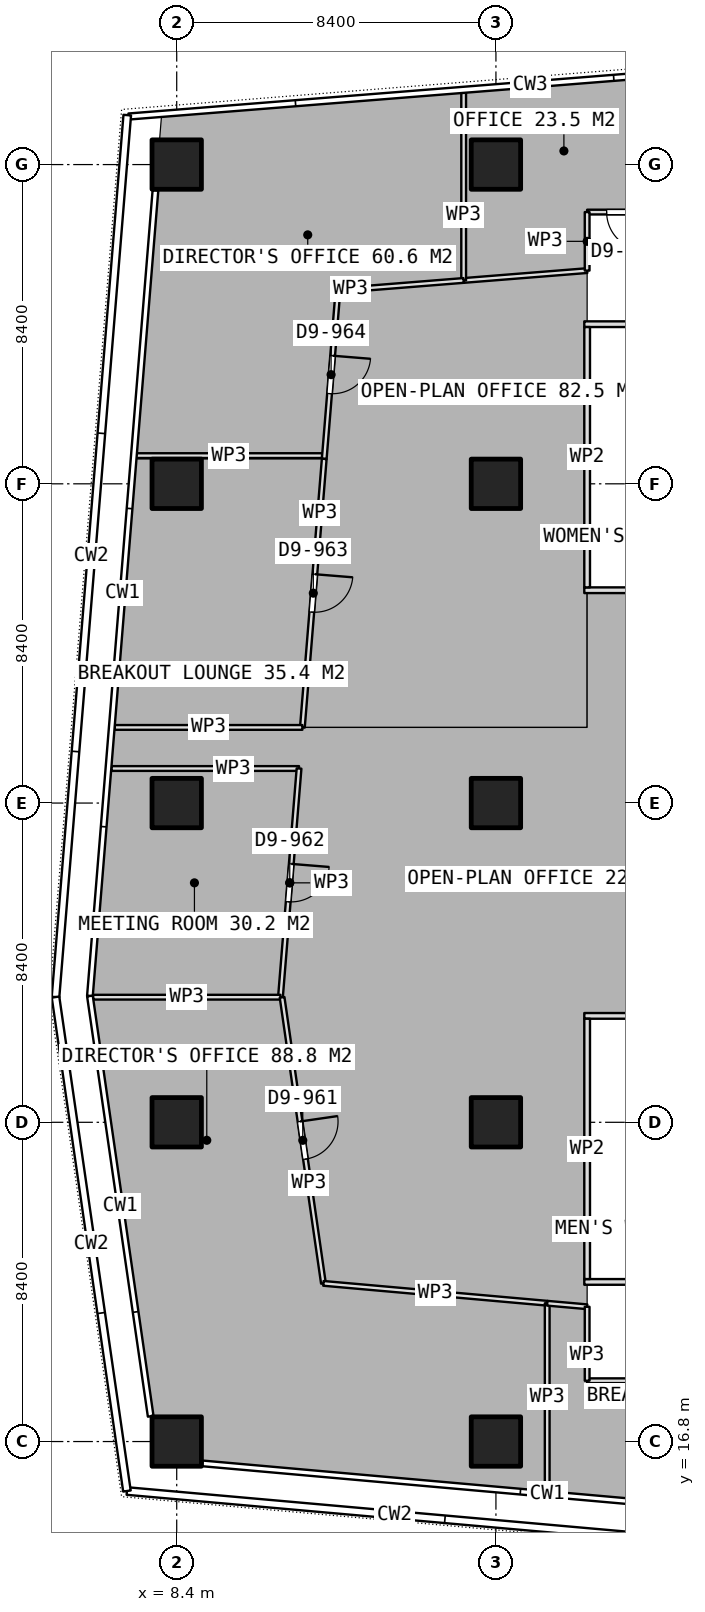
"""IFC4 building model, lengths in metres.
Left out: names, types, materials, properties, quantities, classifications, styles, units other than length and angle.
Written with IfcOpenShell. Run it as: python <this file> out.ifc"""

import sys

from ifc_helpers import new_model, si_unit, direction, frame, frame_2d, origin, origin_2d, place, context, subcontext, project, spatial, rectangle, extrude, element, fill, save


model = new_model("IFC4")
c1 = context("Model", 3, precision=1e-05, world=origin(), true_north=direction((0.0, 1.0)))
c2 = subcontext(c1, "Body", "Model", "MODEL_VIEW")
j1 = project(units=[si_unit("LENGTHUNIT", "METRE"), si_unit("PLANEANGLEUNIT", "RADIAN")], contexts=[c1])
p1 = place(None, origin())
s1 = spatial("IfcSite", under=j1, at=p1, CompositionType="ELEMENT")
p2 = place(p1, origin())
s2 = spatial("IfcBuilding", under=s1, at=p2, CompositionType="ELEMENT")
p3 = place(p2, frame((0.0, 0.0, 257.6)))
s3 = spatial("IfcBuildingStorey", under=s2, at=p3, CompositionType="ELEMENT", Elevation=257.6)
for number, where, z_axis, x_axis in (
    (1, (8.4, 16.8, 0.0), (0.0, 0.0, 1.0), (1.0, 0.0, 0.0)),
    (2, (8.4, 25.2, 0.0), (0.0, 0.0, 1.0), (1.0, 0.0, 0.0)),
    (3, (8.4, 33.6, 0.0), (0.0, 0.0, 1.0), (1.0, 0.0, 0.0)),
    (4, (8.4, 42.0, 0.0), (0.0, 0.0, 1.0), (1.0, 0.0, 0.0)),
    (5, (8.4, 50.4, 0.0), (0.0, 0.0, 1.0), (1.0, 0.0, 0.0)),
    (6, (16.8, 16.8, 0.0), (0.0, 0.0, 1.0), (1.0, 0.0, 0.0)),
    (7, (16.8, 25.2, 0.0), (0.0, 0.0, 1.0), (1.0, 0.0, 0.0)),
    (8, (16.8, 33.6, 0.0), (0.0, 0.0, 1.0), (1.0, 0.0, 0.0)),
    (9, (16.8, 42.0, 0.0), (0.0, 0.0, 1.0), (1.0, 0.0, 0.0)),
    (10, (16.8, 50.4, 0.0), (0.0, 0.0, 1.0), (1.0, 0.0, 0.0)),
):
    element("IfcColumn", number, at=place(p3, frame(where, z_axis=z_axis, x_axis=x_axis)), inside=s3, PredefinedType="COLUMN", context=c2, shape_type="SweptSolid", body=[
        extrude(rectangle(XDim=1.3, YDim=1.3, at=origin_2d()), origin(), (0.0, 0.0, 1.0), 3.75),
    ])
for number, where, z_axis, x_axis in (
    (11, (19.125, 39.2, 0.0), (0.0, 0.0, 1.0), (1.0, 0.0, 0.0)),
    (12, (19.125, 46.2, 0.0), (0.0, 0.0, 1.0), (1.0, 0.0, 0.0)),
):
    element("IfcWall", number, at=place(p3, frame(where, z_axis=z_axis, x_axis=x_axis)), inside=s3, PredefinedType="PARTITIONING", context=c2, shape_type="SweptSolid", body=[
        extrude(rectangle(XDim=3.35, YDim=0.15, at=frame_2d((1.675, 0.0))), origin(), (0.0, 0.0, 1.0), 3.5),
    ])
p4 = place(p3, frame((19.2, 39.275, 0.0), z_axis=(0.0, 0.0, 1.0), x_axis=(0.0, 1.0, 0.0)))
e13 = element("IfcWall", 13, at=p4, inside=s3, PredefinedType="PARTITIONING", context=c2, shape_type="SweptSolid", body=[
    extrude(rectangle(XDim=6.85, YDim=0.15, at=frame_2d((3.425, 0.0))), origin(), (0.0, 0.0, 1.0), 3.5),
])
for number, where, z_axis, x_axis in (
    (14, (19.125, 21.0, 0.0), (0.0, 0.0, 1.0), (1.0, 0.0, 0.0)),
    (15, (19.125, 28.0, 0.0), (0.0, 0.0, 1.0), (1.0, 0.0, 0.0)),
):
    element("IfcWall", number, at=place(p3, frame(where, z_axis=z_axis, x_axis=x_axis)), inside=s3, PredefinedType="PARTITIONING", context=c2, shape_type="SweptSolid", body=[
        extrude(rectangle(XDim=3.35, YDim=0.15, at=frame_2d((1.675, 0.0))), origin(), (0.0, 0.0, 1.0), 3.5),
    ])
p5 = place(p3, frame((19.2, 21.075, 0.0), z_axis=(0.0, 0.0, 1.0), x_axis=(0.0, 1.0, 0.0)))
e16 = element("IfcWall", 16, at=p5, inside=s3, PredefinedType="PARTITIONING", context=c2, shape_type="SweptSolid", body=[
    extrude(rectangle(XDim=6.85, YDim=0.15, at=frame_2d((3.425, 0.0))), origin(), (0.0, 0.0, 1.0), 3.5),
])
p6 = place(p3, frame((19.2, 47.61, 0.0), z_axis=(0.0, 0.0, 1.0), x_axis=(-0.99683691537, -0.079474298708, 0.0)))
e17 = element("IfcWall", 17, at=p6, inside=s3, PredefinedType="PARTITIONING", context=c2, shape_type="SweptSolid", body=[
    extrude(rectangle(XDim=3.259, YDim=0.125, at=frame_2d((1.63, 0.0))), origin(), (0.0, 0.0, 1.0), 3.5),
])
p7 = place(p3, frame((15.951, 47.351, 0.0), z_axis=(0.0, 0.0, 1.0), x_axis=(0.0, 1.0, 0.0)))
e18 = element("IfcWall", 18, at=p7, inside=s3, PredefinedType="PARTITIONING", context=c2, shape_type="SweptSolid", body=[
    extrude(rectangle(XDim=4.936, YDim=0.125, at=frame_2d((2.468, 0.0))), origin(), (0.0, 0.0, 1.0), 3.5),
])
p8 = place(p3, frame((21.226, 49.15, 0.0), z_axis=(0.0, 0.0, 1.0), x_axis=(-1.0, 0.0, 0.0)))
e19 = element("IfcWall", 19, at=p8, inside=s3, PredefinedType="PARTITIONING", context=c2, shape_type="SweptSolid", body=[
    extrude(rectangle(XDim=2.026, YDim=0.125, at=frame_2d((1.013, 0.0))), origin(), (0.0, 0.0, 1.0), 3.5),
])
p9 = place(p8, frame((0.513, 0.0, 0.0)))
e20 = element("IfcOpeningElement", 20, at=p9, cuts=e19, PredefinedType="OPENING", context=c2, shape_type="SweptSolid", body=[
    extrude(rectangle(XDim=1.0, YDim=2.1, at=frame_2d((0.5, 1.05))), frame((0.0, 0.073, 0.0), z_axis=(0.0, -1.0, 0.0), x_axis=(1.0, 0.0, 0.0)), (0.0, 0.0, 1.0), 0.145),
])
p10 = place(p3, frame((19.2, 49.15, 0.0), z_axis=(0.0, 0.0, 1.0), x_axis=(0.0, -1.0, 0.0)))
e21 = element("IfcWall", 21, at=p10, inside=s3, PredefinedType="PARTITIONING", context=c2, shape_type="SweptSolid", body=[
    extrude(rectangle(XDim=1.54, YDim=0.125, at=frame_2d((0.77, 0.0))), origin(), (0.0, 0.0, 1.0), 3.5),
])
p11 = place(p3, frame((12.226, 42.742, 0.0), z_axis=(0.0, 0.0, 1.0), x_axis=(-1.0, 0.0, 0.0)))
e22 = element("IfcWall", 22, at=p11, inside=s3, PredefinedType="PARTITIONING", context=c2, shape_type="SweptSolid", body=[
    extrude(rectangle(XDim=4.903, YDim=0.125, at=frame_2d((2.452, 0.0))), origin(), (0.0, 0.0, 1.0), 3.5),
])
p12 = place(p3, frame((15.95, 47.351, 0.0), z_axis=(0.0, 0.0, 1.0), x_axis=(-0.99682463174, -0.07962822086, 0.0)))
e23 = element("IfcWall", 23, at=p12, inside=s3, PredefinedType="PARTITIONING", context=c2, shape_type="SweptSolid", body=[
    extrude(rectangle(XDim=3.317, YDim=0.125, at=frame_2d((1.659, 0.0))), origin(), (0.0, 0.0, 1.0), 3.5),
])
p13 = place(p3, frame((12.643, 47.087, 0.0), z_axis=(0.0, 0.0, 1.0), x_axis=(-0.081240627764, -0.996694517092, 0.0)))
e24 = element("IfcWall", 24, at=p13, inside=s3, PredefinedType="PARTITIONING", context=c2, shape_type="SweptSolid", body=[
    extrude(rectangle(XDim=4.445, YDim=0.125, at=frame_2d((2.222, 0.0))), origin(), (0.0, 0.0, 1.0), 3.5),
])
p14 = place(p13, frame((1.722, 0.0, 0.0)))
e25 = element("IfcOpeningElement", 25, at=p14, cuts=e24, PredefinedType="OPENING", context=c2, shape_type="SweptSolid", body=[
    extrude(rectangle(XDim=1.0, YDim=2.1, at=frame_2d((0.5, 1.05))), frame((0.0, 0.073, 0.0), z_axis=(0.0, -1.0, 0.0), x_axis=(1.0, 0.0, 0.0)), (0.0, 0.0, 1.0), 0.145),
])
p15 = place(p3, frame((12.282, 42.656, 0.0), z_axis=(0.0, 0.0, 1.0), x_axis=(-0.08110159124, -0.996705840205, 0.0)))
e26 = element("IfcWall", 26, at=p15, inside=s3, PredefinedType="PARTITIONING", context=c2, shape_type="SweptSolid", body=[
    extrude(rectangle(XDim=7.089, YDim=0.125, at=frame_2d((3.545, 0.0))), origin(), (0.0, 0.0, 1.0), 3.5),
])
p16 = place(p15, frame((3.045, 0.0, 0.0)))
e27 = element("IfcOpeningElement", 27, at=p16, cuts=e26, PredefinedType="OPENING", context=c2, shape_type="SweptSolid", body=[
    extrude(rectangle(XDim=1.0, YDim=2.1, at=frame_2d((0.5, 1.05))), frame((0.0, 0.073, 0.0), z_axis=(0.0, -1.0, 0.0), x_axis=(1.0, 0.0, 0.0)), (0.0, 0.0, 1.0), 0.145),
])
p17 = place(p3, frame((11.707, 35.59, 0.0), z_axis=(0.0, 0.0, 1.0), x_axis=(-1.0, 0.0, 0.0)))
e28 = element("IfcWall", 28, at=p17, inside=s3, PredefinedType="PARTITIONING", context=c2, shape_type="SweptSolid", body=[
    extrude(rectangle(XDim=4.936, YDim=0.125, at=frame_2d((2.468, 0.0))), origin(), (0.0, 0.0, 1.0), 3.5),
])
p18 = place(p3, frame((6.683, 34.509, 0.0), z_axis=(0.0, 0.0, 1.0), x_axis=(1.0, 0.0, 0.0)))
e29 = element("IfcWall", 29, at=p18, inside=s3, PredefinedType="PARTITIONING", context=c2, shape_type="SweptSolid", body=[
    extrude(rectangle(XDim=4.936, YDim=0.125, at=frame_2d((2.468, 0.0))), origin(), (0.0, 0.0, 1.0), 3.5),
])
p19 = place(p3, frame((11.619, 34.509, 0.0), z_axis=(0.0, 0.0, 1.0), x_axis=(-0.081003722278, -0.99671379893, 0.0)))
e30 = element("IfcWall", 30, at=p19, inside=s3, PredefinedType="PARTITIONING", context=c2, shape_type="SweptSolid", body=[
    extrude(rectangle(XDim=6.037, YDim=0.125, at=frame_2d((3.019, 0.0))), origin(), (0.0, 0.0, 1.0), 3.5),
])
p20 = place(p19, frame((2.518, 0.0, 0.0)))
e31 = element("IfcOpeningElement", 31, at=p20, cuts=e30, PredefinedType="OPENING", context=c2, shape_type="SweptSolid", body=[
    extrude(rectangle(XDim=1.0, YDim=2.1, at=frame_2d((0.5, 1.05))), frame((0.0, 0.073, 0.0), z_axis=(0.0, -1.0, 0.0), x_axis=(1.0, 0.0, 0.0)), (0.0, 0.0, 1.0), 0.145),
])
p21 = place(p3, frame((11.13, 28.492, 0.0), z_axis=(0.0, 0.0, 1.0), x_axis=(-1.0, 0.0, 0.0)))
e32 = element("IfcWall", 32, at=p21, inside=s3, PredefinedType="PARTITIONING", context=c2, shape_type="SweptSolid", body=[
    extrude(rectangle(XDim=4.929, YDim=0.125, at=frame_2d((2.464, 0.0))), origin(), (0.0, 0.0, 1.0), 3.5),
])
p22 = place(p3, frame((11.173, 28.488, 0.0), z_axis=(0.0, 0.0, 1.0), x_axis=(0.143061748966, -0.989713764673, 0.0)))
e33 = element("IfcWall", 33, at=p22, inside=s3, PredefinedType="PARTITIONING", context=c2, shape_type="SweptSolid", body=[
    extrude(rectangle(XDim=7.604, YDim=0.125, at=frame_2d((3.802, 0.0))), origin(), (0.0, 0.0, 1.0), 3.5),
])
p23 = place(p22, frame((3.301, 0.0, 0.0)))
e34 = element("IfcOpeningElement", 34, at=p23, cuts=e33, PredefinedType="OPENING", context=c2, shape_type="SweptSolid", body=[
    extrude(rectangle(XDim=1.0, YDim=2.1, at=frame_2d((0.5, 1.05))), frame((0.0, 0.073, 0.0), z_axis=(0.0, -1.0, 0.0), x_axis=(1.0, 0.0, 0.0)), (0.0, 0.0, 1.0), 0.145),
])
p24 = place(p3, frame((12.261, 20.962, 0.0), z_axis=(0.0, 0.0, 1.0), x_axis=(0.996078951833, -0.08846876124, 0.0)))
e35 = element("IfcWall", 35, at=p24, inside=s3, PredefinedType="PARTITIONING", context=c2, shape_type="SweptSolid", body=[
    extrude(rectangle(XDim=5.911, YDim=0.125, at=frame_2d((2.956, 0.0))), origin(), (0.0, 0.0, 1.0), 3.5),
])
p25 = place(p3, frame((18.149, 20.439, 0.0), z_axis=(0.0, 0.0, 1.0), x_axis=(0.0, -1.0, 0.0)))
e36 = element("IfcWall", 36, at=p25, inside=s3, PredefinedType="PARTITIONING", context=c2, shape_type="SweptSolid", body=[
    extrude(rectangle(XDim=4.939, YDim=0.125, at=frame_2d((2.469, 0.0))), origin(), (0.0, 0.0, 1.0), 3.5),
])
p26 = place(p3, frame((19.2, 18.4, 0.0), z_axis=(0.0, 0.0, 1.0), x_axis=(1.0, 0.0, 0.0)))
e37 = element("IfcWall", 37, at=p26, inside=s3, PredefinedType="PARTITIONING", context=c2, shape_type="SweptSolid", body=[
    extrude(rectangle(XDim=8.054, YDim=0.125, at=frame_2d((4.027, 0.0))), origin(), (0.0, 0.0, 1.0), 3.5),
])
p27 = place(p3, frame((18.15, 20.439, 0.0), z_axis=(0.0, 0.0, 1.0), x_axis=(0.996099374617, -0.088238517026, 0.0)))
e38 = element("IfcWall", 38, at=p27, inside=s3, PredefinedType="PARTITIONING", context=c2, shape_type="SweptSolid", body=[
    extrude(rectangle(XDim=1.054, YDim=0.125, at=frame_2d((0.527, 0.0))), origin(), (0.0, 0.0, 1.0), 3.5),
])
p28 = place(p3, frame((19.2, 20.346, 0.0), z_axis=(0.0, 0.0, 1.0), x_axis=(0.0, -1.0, 0.0)))
e39 = element("IfcWall", 39, at=p28, inside=s3, PredefinedType="PARTITIONING", context=c2, shape_type="SweptSolid", body=[
    extrude(rectangle(XDim=1.946, YDim=0.125, at=frame_2d((0.973, 0.0))), origin(), (0.0, 0.0, 1.0), 3.5),
])
p29 = place(p9, origin())
e40 = element("IfcDoor", 40, at=p29, inside=s3, OperationType="SINGLE_SWING_LEFT", PredefinedType="DOOR", context=c2, shape_type="SweptSolid", body=[
    extrude(rectangle(XDim=1.0, YDim=2.1, at=frame_2d((0.5, 1.05))), frame((0.0, 0.025, 0.0), z_axis=(0.0, -1.0, 0.0), x_axis=(1.0, 0.0, 0.0)), (0.0, 0.0, 1.0), 0.05),
])
fill(e20, e40)
p30 = place(p14, origin())
e41 = element("IfcDoor", 41, at=p30, inside=s3, OperationType="SINGLE_SWING_LEFT", PredefinedType="DOOR", context=c2, shape_type="SweptSolid", body=[
    extrude(rectangle(XDim=1.0, YDim=2.1, at=frame_2d((0.5, 1.05))), frame((0.0, 0.025, 0.0), z_axis=(0.0, -1.0, 0.0), x_axis=(1.0, 0.0, 0.0)), (0.0, 0.0, 1.0), 0.05),
])
fill(e25, e41)
p31 = place(p16, origin())
e42 = element("IfcDoor", 42, at=p31, inside=s3, OperationType="SINGLE_SWING_LEFT", PredefinedType="DOOR", context=c2, shape_type="SweptSolid", body=[
    extrude(rectangle(XDim=1.0, YDim=2.1, at=frame_2d((0.5, 1.05))), frame((0.0, 0.025, 0.0), z_axis=(0.0, -1.0, 0.0), x_axis=(1.0, 0.0, 0.0)), (0.0, 0.0, 1.0), 0.05),
])
fill(e27, e42)
p32 = place(p20, origin())
e43 = element("IfcDoor", 43, at=p32, inside=s3, OperationType="SINGLE_SWING_LEFT", PredefinedType="DOOR", context=c2, shape_type="SweptSolid", body=[
    extrude(rectangle(XDim=1.0, YDim=2.1, at=frame_2d((0.5, 1.05))), frame((0.0, 0.025, 0.0), z_axis=(0.0, -1.0, 0.0), x_axis=(1.0, 0.0, 0.0)), (0.0, 0.0, 1.0), 0.05),
])
fill(e31, e43)
p33 = place(p23, origin())
e44 = element("IfcDoor", 44, at=p33, inside=s3, OperationType="SINGLE_SWING_LEFT", PredefinedType="DOOR", context=c2, shape_type="SweptSolid", body=[
    extrude(rectangle(XDim=1.0, YDim=2.1, at=frame_2d((0.5, 1.05))), frame((0.0, 0.025, 0.0), z_axis=(0.0, -1.0, 0.0), x_axis=(1.0, 0.0, 0.0)), (0.0, 0.0, 1.0), 0.05),
])
fill(e34, e44)
save(model, sys.argv[1])
